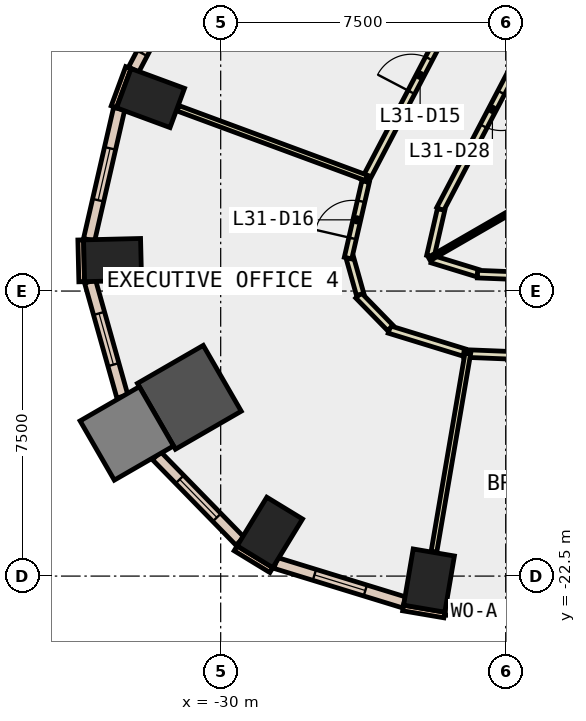
"""IFC4 building model, lengths in metres.
Left out: names, types, materials, properties, quantities, classifications, styles, units other than length and angle.
Written with IfcOpenShell. Run it as: python <this file> out.ifc"""

import sys

from ifc_helpers import new_model, si_unit, direction, frame, frame_2d, origin, origin_2d, place, context, subcontext, project, spatial, rectangle, extrude, element, fill, save


model = new_model("IFC4")
c1 = context("Model", 3, precision=1e-05, world=origin(), true_north=direction((0.0, 1.0)))
c2 = subcontext(c1, "Body", "Model", "MODEL_VIEW")
j1 = project(units=[si_unit("LENGTHUNIT", "METRE"), si_unit("PLANEANGLEUNIT", "RADIAN")], contexts=[c1])
p1 = place(None, origin())
s1 = spatial("IfcSite", under=j1, at=p1, CompositionType="ELEMENT")
p2 = place(p1, origin())
s2 = spatial("IfcBuilding", under=s1, at=p2, CompositionType="ELEMENT")
p3 = place(p2, frame((0.0, 0.0, 142.4)))
s3 = spatial("IfcBuildingStorey", under=s2, at=p3, CompositionType="ELEMENT", Elevation=142.4)
for number, where, z_axis, x_axis in (
    (1, (-24.518, -22.618, -0.4), (0.0, 0.0, 1.0), (-0.986, 0.168, 0.0)),
    (2, (-31.846, -9.923, -0.4), (0.0, 0.0, 1.0), (0.347, 0.938, 0.0)),
    (3, (-32.845, -14.185, -0.4), (0.0, 0.0, 1.0), (-0.024, 1.0, 0.0)),
):
    element("IfcColumn", number, at=place(p3, frame(where, z_axis=z_axis, x_axis=x_axis)), inside=s3, PredefinedType="COLUMN", context=c2, shape_type="SweptSolid", body=[
        extrude(rectangle(XDim=1.1, YDim=1.5, at=origin_2d()), origin(), (0.0, 0.0, 1.0), 4.2),
    ])
p4 = place(p3, frame((-30.825, -17.796, -0.4), z_axis=(0.0, 0.0, 1.0), x_axis=(0.866025403784, 0.5, 0.0)))
e4 = element("IfcColumn", 4, at=p4, inside=s3, PredefinedType="COLUMN", context=c2, shape_type="SweptSolid", body=[
    extrude(rectangle(XDim=2.0, YDim=2.0, at=origin_2d()), origin(), (0.0, 0.0, 1.0), 4.2),
])
p5 = place(p3, frame((-28.707, -21.352, -0.4), z_axis=(0.0, 0.0, 1.0), x_axis=(-0.853714435155, 0.520741455243, 0.0)))
e5 = element("IfcColumn", 5, at=p5, inside=s3, PredefinedType="COLUMN", context=c2, shape_type="SweptSolid", body=[
    extrude(rectangle(XDim=1.1, YDim=1.5, at=origin_2d()), origin(), (0.0, 0.0, 1.0), 4.2),
])
p6 = place(p3, frame((-32.47, -18.746, -0.4), z_axis=(0.0, 0.0, 1.0), x_axis=(0.866025403784, 0.5, 0.0)))
e6 = element("IfcColumn", 6, at=p6, inside=s3, PredefinedType="COLUMN", context=c2, shape_type="SweptSolid", body=[
    extrude(rectangle(XDim=1.8, YDim=1.8, at=origin_2d()), origin(), (0.0, 0.0, 1.0), 4.2),
])
p7 = place(p3, frame((-32.429, -9.121, 0.0), z_axis=(0.0, 0.0, 1.0), x_axis=(-0.346425160624, -0.93807761304, 0.0)))
e7 = element("IfcWall", 7, at=p7, inside=s3, PredefinedType="STANDARD", context=c2, shape_type="SweptSolid", body=[
    extrude(rectangle(XDim=1.1, YDim=0.15, at=frame_2d((0.55, 0.0))), origin(), (0.0, 0.0, 1.0), 3.8),
])
p8 = place(p3, frame((-25.199, -23.339, 0.0), z_axis=(0.0, 0.0, 1.0), x_axis=(0.985800082077, -0.167923191299, 0.0)))
e8 = element("IfcWall", 8, at=p8, inside=s3, PredefinedType="STANDARD", context=c2, shape_type="SweptSolid", body=[
    extrude(rectangle(XDim=1.101, YDim=0.15, at=frame_2d((0.55, 0.0))), origin(), (0.0, 0.0, 1.0), 3.8),
])
p9 = place(p3, frame((-33.683, -13.655, 0.0), z_axis=(0.0, 0.0, 1.0), x_axis=(0.023744690764, -0.999718055084, 0.0)))
e9 = element("IfcWall", 9, at=p9, inside=s3, PredefinedType="STANDARD", context=c2, shape_type="SweptSolid", body=[
    extrude(rectangle(XDim=1.1, YDim=0.15, at=frame_2d((0.55, 0.0))), origin(), (0.0, 0.0, 1.0), 3.8),
])
p10 = place(p3, frame((-29.606, -21.77, 0.0), z_axis=(0.0, 0.0, 1.0), x_axis=(0.854005542721, -0.520263907071, 0.0)))
e10 = element("IfcWall", 10, at=p10, inside=s3, PredefinedType="STANDARD", context=c2, shape_type="SweptSolid", body=[
    extrude(rectangle(XDim=1.099, YDim=0.15, at=frame_2d((0.55, 0.0))), origin(), (0.0, 0.0, 1.0), 3.8),
])
p11 = place(p3, frame((-24.09, -23.378, 0.0), z_axis=(0.0, 0.0, 1.0), x_axis=(0.999203621229, -0.039901420066, 0.0)))
e11 = element("IfcWall", 11, at=p11, inside=s3, PredefinedType="STANDARD", context=c2, shape_type="SweptSolid", body=[
    extrude(rectangle(XDim=7.318, YDim=0.3, at=frame_2d((3.659, 0.0))), origin(), (0.0, 0.0, 1.0), 3.8),
])
p12 = place(p11, frame((0.629, 0.0, 0.9)))
e12 = element("IfcOpeningElement", 12, at=p12, cuts=e11, PredefinedType="OPENING", context=c2, shape_type="SweptSolid", body=[
    extrude(rectangle(XDim=2.4, YDim=2.6, at=frame_2d((1.2, 1.3))), frame((0.0, 0.16, 0.0), z_axis=(0.0, -1.0, 0.0), x_axis=(1.0, 0.0, 0.0)), (0.0, 0.0, 1.0), 0.32),
])
p13 = place(p11, frame((4.288, 0.0, 0.9)))
e13 = element("IfcOpeningElement", 13, at=p13, cuts=e11, PredefinedType="OPENING", context=c2, shape_type="SweptSolid", body=[
    extrude(rectangle(XDim=2.4, YDim=2.6, at=frame_2d((1.2, 1.3))), frame((0.0, 0.16, 0.0), z_axis=(0.0, -1.0, 0.0), x_axis=(1.0, 0.0, 0.0)), (0.0, 0.0, 1.0), 0.32),
])
p14 = place(p3, frame((-29.542, -3.922, 0.0), z_axis=(0.0, 0.0, 1.0), x_axis=(-0.463809970306, -0.885934710599, 0.0)))
e14 = element("IfcWall", 14, at=p14, inside=s3, PredefinedType="STANDARD", context=c2, shape_type="SweptSolid", body=[
    extrude(rectangle(XDim=5.927, YDim=0.3, at=frame_2d((2.963, 0.0))), origin(), (0.0, 0.0, 1.0), 3.8),
])
p15 = place(p14, frame((0.482, 0.0, 0.9)))
e15 = element("IfcOpeningElement", 15, at=p15, cuts=e14, PredefinedType="OPENING", context=c2, shape_type="SweptSolid", body=[
    extrude(rectangle(XDim=2.0, YDim=2.6, at=frame_2d((1.0, 1.3))), frame((0.0, 0.16, 0.0), z_axis=(0.0, -1.0, 0.0), x_axis=(1.0, 0.0, 0.0)), (0.0, 0.0, 1.0), 0.32),
])
p16 = place(p14, frame((3.445, 0.0, 0.9)))
e16 = element("IfcOpeningElement", 16, at=p16, cuts=e14, PredefinedType="OPENING", context=c2, shape_type="SweptSolid", body=[
    extrude(rectangle(XDim=2.0, YDim=2.6, at=frame_2d((1.0, 1.3))), frame((0.0, 0.16, 0.0), z_axis=(0.0, -1.0, 0.0), x_axis=(1.0, 0.0, 0.0)), (0.0, 0.0, 1.0), 0.32),
])
p17 = place(p3, frame((-32.672, -10.203, 0.0), z_axis=(0.0, 0.0, 1.0), x_axis=(-0.223538714932, -0.974695051247, 0.0)))
e17 = element("IfcWall", 17, at=p17, inside=s3, PredefinedType="STANDARD", context=c2, shape_type="SweptSolid", body=[
    extrude(rectangle(XDim=3.538, YDim=0.3, at=frame_2d((1.769, 0.0))), origin(), (0.0, 0.0, 1.0), 3.8),
])
p18 = place(p17, frame((1.069, 0.0, 0.9)))
e18 = element("IfcOpeningElement", 18, at=p18, cuts=e17, PredefinedType="OPENING", context=c2, shape_type="SweptSolid", body=[
    extrude(rectangle(XDim=1.4, YDim=2.6, at=frame_2d((0.7, 1.3))), frame((0.0, 0.16, 0.0), z_axis=(0.0, -1.0, 0.0), x_axis=(1.0, 0.0, 0.0)), (0.0, 0.0, 1.0), 0.32),
])
p19 = place(p3, frame((-33.437, -14.749, 0.0), z_axis=(0.0, 0.0, 1.0), x_axis=(0.270471130801, -0.962728085912, 0.0)))
e19 = element("IfcWall", 19, at=p19, inside=s3, PredefinedType="STANDARD", context=c2, shape_type="SweptSolid", body=[
    extrude(rectangle(XDim=3.143, YDim=0.3, at=frame_2d((1.572, 0.0))), origin(), (0.0, 0.0, 1.0), 3.8),
])
p20 = place(p19, frame((0.872, 0.0, 0.9)))
e20 = element("IfcOpeningElement", 20, at=p20, cuts=e19, PredefinedType="OPENING", context=c2, shape_type="SweptSolid", body=[
    extrude(rectangle(XDim=1.4, YDim=2.6, at=frame_2d((0.7, 1.3))), frame((0.0, 0.16, 0.0), z_axis=(0.0, -1.0, 0.0), x_axis=(1.0, 0.0, 0.0)), (0.0, 0.0, 1.0), 0.32),
])
p21 = place(p3, frame((-31.688, -19.332, 0.0), z_axis=(0.0, 0.0, 1.0), x_axis=(0.698633260198, -0.715479956215, 0.0)))
e21 = element("IfcWall", 21, at=p21, inside=s3, PredefinedType="STANDARD", context=c2, shape_type="SweptSolid", body=[
    extrude(rectangle(XDim=3.145, YDim=0.3, at=frame_2d((1.572, 0.0))), origin(), (0.0, 0.0, 1.0), 3.8),
])
p22 = place(p21, frame((0.872, 0.0, 0.9)))
e22 = element("IfcOpeningElement", 22, at=p22, cuts=e21, PredefinedType="OPENING", context=c2, shape_type="SweptSolid", body=[
    extrude(rectangle(XDim=1.4, YDim=2.6, at=frame_2d((0.7, 1.3))), frame((0.0, 0.16, 0.0), z_axis=(0.0, -1.0, 0.0), x_axis=(1.0, 0.0, 0.0)), (0.0, 0.0, 1.0), 0.32),
])
p23 = place(p3, frame((-28.554, -22.154, 0.0), z_axis=(0.0, 0.0, 1.0), x_axis=(0.955874475611, -0.293775402094, 0.0)))
e23 = element("IfcWall", 23, at=p23, inside=s3, PredefinedType="STANDARD", context=c2, shape_type="SweptSolid", body=[
    extrude(rectangle(XDim=3.537, YDim=0.3, at=frame_2d((1.769, 0.0))), origin(), (0.0, 0.0, 1.0), 3.8),
])
p24 = place(p23, frame((1.069, 0.0, 0.9)))
e24 = element("IfcOpeningElement", 24, at=p24, cuts=e23, PredefinedType="OPENING", context=c2, shape_type="SweptSolid", body=[
    extrude(rectangle(XDim=1.4, YDim=2.6, at=frame_2d((0.7, 1.3))), frame((0.0, 0.16, 0.0), z_axis=(0.0, -1.0, 0.0), x_axis=(1.0, 0.0, 0.0)), (0.0, 0.0, 1.0), 0.32),
])
p25 = place(p3, frame((-21.475, -7.594, 0.0), z_axis=(0.0, 0.0, 1.0), x_axis=(-0.463809970306, -0.885934710599, 0.0)))
e25 = element("IfcWall", 25, at=p25, inside=s3, PredefinedType="PARTITIONING", context=c2, shape_type="SweptSolid", body=[
    extrude(rectangle(XDim=5.927, YDim=0.2, at=frame_2d((2.963, 0.0))), origin(), (0.0, 0.0, 1.0), 3.8),
])
p26 = place(p25, frame((2.464, 0.0, 0.0)))
e26 = element("IfcOpeningElement", 26, at=p26, cuts=e25, PredefinedType="OPENING", context=c2, shape_type="SweptSolid", body=[
    extrude(rectangle(XDim=1.0, YDim=2.1, at=frame_2d((0.5, 1.05))), frame((0.0, 0.11, 0.0), z_axis=(0.0, -1.0, 0.0), x_axis=(1.0, 0.0, 0.0)), (0.0, 0.0, 1.0), 0.22),
])
p27 = place(p3, frame((-24.2, -12.854, 0.0), z_axis=(0.0, 0.0, 1.0), x_axis=(-0.223967203961, -0.974596681479, 0.0)))
e27 = element("IfcWall", 27, at=p27, inside=s3, PredefinedType="PARTITIONING", context=c2, shape_type="SweptSolid", body=[
    extrude(rectangle(XDim=1.259, YDim=0.2, at=frame_2d((0.629, 0.0))), origin(), (0.0, 0.0, 1.0), 3.8),
])
p28 = place(p3, frame((-24.435, -14.162, 0.0), z_axis=(0.0, 0.0, 1.0), x_axis=(0.956086269468, -0.293085389152, 0.0)))
e28 = element("IfcWall", 28, at=p28, inside=s3, PredefinedType="PARTITIONING", context=c2, shape_type="SweptSolid", body=[
    extrude(rectangle(XDim=1.252, YDim=0.2, at=frame_2d((0.626, 0.0))), origin(), (0.0, 0.0, 1.0), 3.8),
])
p29 = place(p3, frame((-23.242, -14.555, 0.0), z_axis=(0.0, 0.0, 1.0), x_axis=(0.999202143743, -0.039938401802, 0.0)))
e29 = element("IfcWall", 29, at=p29, inside=s3, PredefinedType="PARTITIONING", context=c2, shape_type="SweptSolid", body=[
    extrude(rectangle(XDim=7.238, YDim=0.2, at=frame_2d((3.619, 0.0))), origin(), (0.0, 0.0, 1.0), 3.8),
])
p30 = place(p29, frame((3.119, 0.0, 0.0)))
e30 = element("IfcOpeningElement", 30, at=p30, cuts=e29, PredefinedType="OPENING", context=c2, shape_type="SweptSolid", body=[
    extrude(rectangle(XDim=1.0, YDim=2.1, at=frame_2d((0.5, 1.05))), frame((0.0, 0.11, 0.0), z_axis=(0.0, -1.0, 0.0), x_axis=(1.0, 0.0, 0.0)), (0.0, 0.0, 1.0), 0.22),
])
p31 = place(p3, frame((-26.21, -12.111, 0.0), z_axis=(0.0, 0.0, 1.0), x_axis=(0.46374980173, 0.885966207818, 0.0)))
e31 = element("IfcWall", 31, at=p31, inside=s3, PredefinedType="PARTITIONING", context=c2, shape_type="SweptSolid", body=[
    extrude(rectangle(XDim=6.137, YDim=0.2, at=frame_2d((3.068, 0.0))), origin(), (0.0, 0.0, 1.0), 3.8),
])
p32 = place(p31, frame((2.644, 0.0, 0.0)))
e32 = element("IfcOpeningElement", 32, at=p32, cuts=e31, PredefinedType="OPENING", context=c2, shape_type="SweptSolid", body=[
    extrude(rectangle(XDim=1.0, YDim=2.1, at=frame_2d((0.5, 1.05))), frame((0.0, 0.11, 0.0), z_axis=(0.0, -1.0, 0.0), x_axis=(1.0, 0.0, 0.0)), (0.0, 0.0, 1.0), 0.22),
])
p33 = place(p3, frame((-23.594, -16.617, 0.0), z_axis=(0.0, 0.0, 1.0), x_axis=(-0.955896815358, 0.293702704087, 0.0)))
e33 = element("IfcWall", 33, at=p33, inside=s3, PredefinedType="PARTITIONING", context=c2, shape_type="SweptSolid", body=[
    extrude(rectangle(XDim=2.06, YDim=0.2, at=frame_2d((1.03, 0.0))), origin(), (0.0, 0.0, 1.0), 3.8),
])
p34 = place(p3, frame((-25.538, -15.97, 0.0), z_axis=(0.0, 0.0, 1.0), x_axis=(-0.698272822523, 0.715831729756, 0.0)))
e34 = element("IfcWall", 34, at=p34, inside=s3, PredefinedType="PARTITIONING", context=c2, shape_type="SweptSolid", body=[
    extrude(rectangle(XDim=1.196, YDim=0.2, at=frame_2d((0.598, 0.0))), origin(), (0.0, 0.0, 1.0), 3.8),
])
p35 = place(p3, frame((-26.33, -15.089, 0.0), z_axis=(0.0, 0.0, 1.0), x_axis=(-0.270631784819, 0.962682936925, 0.0)))
e35 = element("IfcWall", 35, at=p35, inside=s3, PredefinedType="PARTITIONING", context=c2, shape_type="SweptSolid", body=[
    extrude(rectangle(XDim=0.994, YDim=0.2, at=frame_2d((0.497, 0.0))), origin(), (0.0, 0.0, 1.0), 3.8),
])
p36 = place(p3, frame((-26.649, -14.133, 0.0), z_axis=(0.0, 0.0, 1.0), x_axis=(0.224108401048, 0.974564222912, 0.0)))
e36 = element("IfcWall", 36, at=p36, inside=s3, PredefinedType="PARTITIONING", context=c2, shape_type="SweptSolid", body=[
    extrude(rectangle(XDim=2.065, YDim=0.2, at=frame_2d((1.033, 0.0))), origin(), (0.0, 0.0, 1.0), 3.8),
])
p37 = place(p36, frame((0.533, 0.0, 0.0)))
e37 = element("IfcOpeningElement", 37, at=p37, cuts=e36, PredefinedType="OPENING", context=c2, shape_type="SweptSolid", body=[
    extrude(rectangle(XDim=1.0, YDim=2.1, at=frame_2d((0.5, 1.05))), frame((0.0, 0.11, 0.0), z_axis=(0.0, -1.0, 0.0), x_axis=(1.0, 0.0, 0.0)), (0.0, 0.0, 1.0), 0.22),
])
p38 = place(p3, frame((-15.94, -16.948, 0.0), z_axis=(0.0, 0.0, 1.0), x_axis=(-0.999203094545, 0.03991460699, 0.0)))
e38 = element("IfcWall", 38, at=p38, inside=s3, PredefinedType="PARTITIONING", context=c2, shape_type="SweptSolid", body=[
    extrude(rectangle(XDim=7.664, YDim=0.2, at=frame_2d((3.832, 0.0))), origin(), (0.0, 0.0, 1.0), 3.8),
])
p39 = place(p38, frame((3.332, 0.0, 0.0)))
e39 = element("IfcOpeningElement", 39, at=p39, cuts=e38, PredefinedType="OPENING", context=c2, shape_type="SweptSolid", body=[
    extrude(rectangle(XDim=1.0, YDim=2.1, at=frame_2d((0.5, 1.05))), frame((0.0, 0.11, 0.0), z_axis=(0.0, -1.0, 0.0), x_axis=(1.0, 0.0, 0.0)), (0.0, 0.0, 1.0), 0.22),
])
p40 = place(p3, frame((-18.553, -10.715, 0.0), z_axis=(0.0, 0.0, 1.0), x_axis=(-0.865984622623, -0.500070628392, 0.0)))
e40 = element("IfcWall", 40, at=p40, inside=s3, PredefinedType="PARTITIONING", context=c2, shape_type="SweptSolid", body=[
    extrude(rectangle(XDim=6.879, YDim=0.1, at=frame_2d((3.439, 0.0))), origin(), (0.0, 0.0, 1.0), 3.8),
])
p41 = place(p3, frame((-26.164, -12.023, 0.0), z_axis=(0.0, 0.0, 1.0), x_axis=(-0.937995804261, 0.346646608505, 0.0)))
e41 = element("IfcWall", 41, at=p41, inside=s3, PredefinedType="PARTITIONING", context=c2, shape_type="SweptSolid", body=[
    extrude(rectangle(XDim=5.288, YDim=0.15, at=frame_2d((2.644, 0.0))), origin(), (0.0, 0.0, 1.0), 3.8),
])
p42 = place(p3, frame((-23.498, -16.646, 0.0), z_axis=(0.0, 0.0, 1.0), x_axis=(-0.168275674737, -0.985739974482, 0.0)))
e42 = element("IfcWall", 42, at=p42, inside=s3, PredefinedType="PARTITIONING", context=c2, shape_type="SweptSolid", body=[
    extrude(rectangle(XDim=5.288, YDim=0.15, at=frame_2d((2.644, 0.0))), origin(), (0.0, 0.0, 1.0), 3.8),
])
p43 = place(p12, origin())
e43 = element("IfcWindow", 43, at=p43, inside=s3, PartitioningType="SINGLE_PANEL", PredefinedType="WINDOW", context=c2, shape_type="SweptSolid", body=[
    extrude(rectangle(XDim=2.4, YDim=2.6, at=frame_2d((1.2, 1.3))), frame((0.0, 0.03, 0.0), z_axis=(0.0, -1.0, 0.0), x_axis=(1.0, 0.0, 0.0)), (0.0, 0.0, 1.0), 0.06),
])
fill(e12, e43)
p44 = place(p16, origin())
e44 = element("IfcWindow", 44, at=p44, inside=s3, PartitioningType="SINGLE_PANEL", PredefinedType="WINDOW", context=c2, shape_type="SweptSolid", body=[
    extrude(rectangle(XDim=2.0, YDim=2.6, at=frame_2d((1.0, 1.3))), frame((0.0, 0.03, 0.0), z_axis=(0.0, -1.0, 0.0), x_axis=(1.0, 0.0, 0.0)), (0.0, 0.0, 1.0), 0.06),
])
fill(e16, e44)
p45 = place(p18, origin())
e45 = element("IfcWindow", 45, at=p45, inside=s3, PartitioningType="SINGLE_PANEL", PredefinedType="WINDOW", context=c2, shape_type="SweptSolid", body=[
    extrude(rectangle(XDim=1.4, YDim=2.6, at=frame_2d((0.7, 1.3))), frame((0.0, 0.03, 0.0), z_axis=(0.0, -1.0, 0.0), x_axis=(1.0, 0.0, 0.0)), (0.0, 0.0, 1.0), 0.06),
])
fill(e18, e45)
p46 = place(p20, origin())
e46 = element("IfcWindow", 46, at=p46, inside=s3, PartitioningType="SINGLE_PANEL", PredefinedType="WINDOW", context=c2, shape_type="SweptSolid", body=[
    extrude(rectangle(XDim=1.4, YDim=2.6, at=frame_2d((0.7, 1.3))), frame((0.0, 0.03, 0.0), z_axis=(0.0, -1.0, 0.0), x_axis=(1.0, 0.0, 0.0)), (0.0, 0.0, 1.0), 0.06),
])
fill(e20, e46)
p47 = place(p22, origin())
e47 = element("IfcWindow", 47, at=p47, inside=s3, PartitioningType="SINGLE_PANEL", PredefinedType="WINDOW", context=c2, shape_type="SweptSolid", body=[
    extrude(rectangle(XDim=1.4, YDim=2.6, at=frame_2d((0.7, 1.3))), frame((0.0, 0.03, 0.0), z_axis=(0.0, -1.0, 0.0), x_axis=(1.0, 0.0, 0.0)), (0.0, 0.0, 1.0), 0.06),
])
fill(e22, e47)
p48 = place(p24, origin())
e48 = element("IfcWindow", 48, at=p48, inside=s3, PartitioningType="SINGLE_PANEL", PredefinedType="WINDOW", context=c2, shape_type="SweptSolid", body=[
    extrude(rectangle(XDim=1.4, YDim=2.6, at=frame_2d((0.7, 1.3))), frame((0.0, 0.03, 0.0), z_axis=(0.0, -1.0, 0.0), x_axis=(1.0, 0.0, 0.0)), (0.0, 0.0, 1.0), 0.06),
])
fill(e24, e48)
p49 = place(p32, origin())
e49 = element("IfcDoor", 49, at=p49, inside=s3, OperationType="SINGLE_SWING_LEFT", PredefinedType="DOOR", context=c2, shape_type="SweptSolid", body=[
    extrude(rectangle(XDim=1.0, YDim=2.1, at=frame_2d((0.5, 1.05))), frame((0.0, 0.025, 0.0), z_axis=(0.0, -1.0, 0.0), x_axis=(1.0, 0.0, 0.0)), (0.0, 0.0, 1.0), 0.05),
])
fill(e32, e49)
p50 = place(p37, origin())
e50 = element("IfcDoor", 50, at=p50, inside=s3, OperationType="SINGLE_SWING_LEFT", PredefinedType="DOOR", context=c2, shape_type="SweptSolid", body=[
    extrude(rectangle(XDim=1.0, YDim=2.1, at=frame_2d((0.5, 1.05))), frame((0.0, 0.025, 0.0), z_axis=(0.0, -1.0, 0.0), x_axis=(1.0, 0.0, 0.0)), (0.0, 0.0, 1.0), 0.05),
])
fill(e37, e50)
p51 = place(p26, origin())
e51 = element("IfcDoor", 51, at=p51, inside=s3, OperationType="SINGLE_SWING_LEFT", PredefinedType="DOOR", context=c2, shape_type="SweptSolid", body=[
    extrude(rectangle(XDim=1.0, YDim=2.1, at=frame_2d((0.5, 1.05))), frame((0.0, 0.025, 0.0), z_axis=(0.0, -1.0, 0.0), x_axis=(1.0, 0.0, 0.0)), (0.0, 0.0, 1.0), 0.05),
])
fill(e26, e51)
save(model, sys.argv[1])
